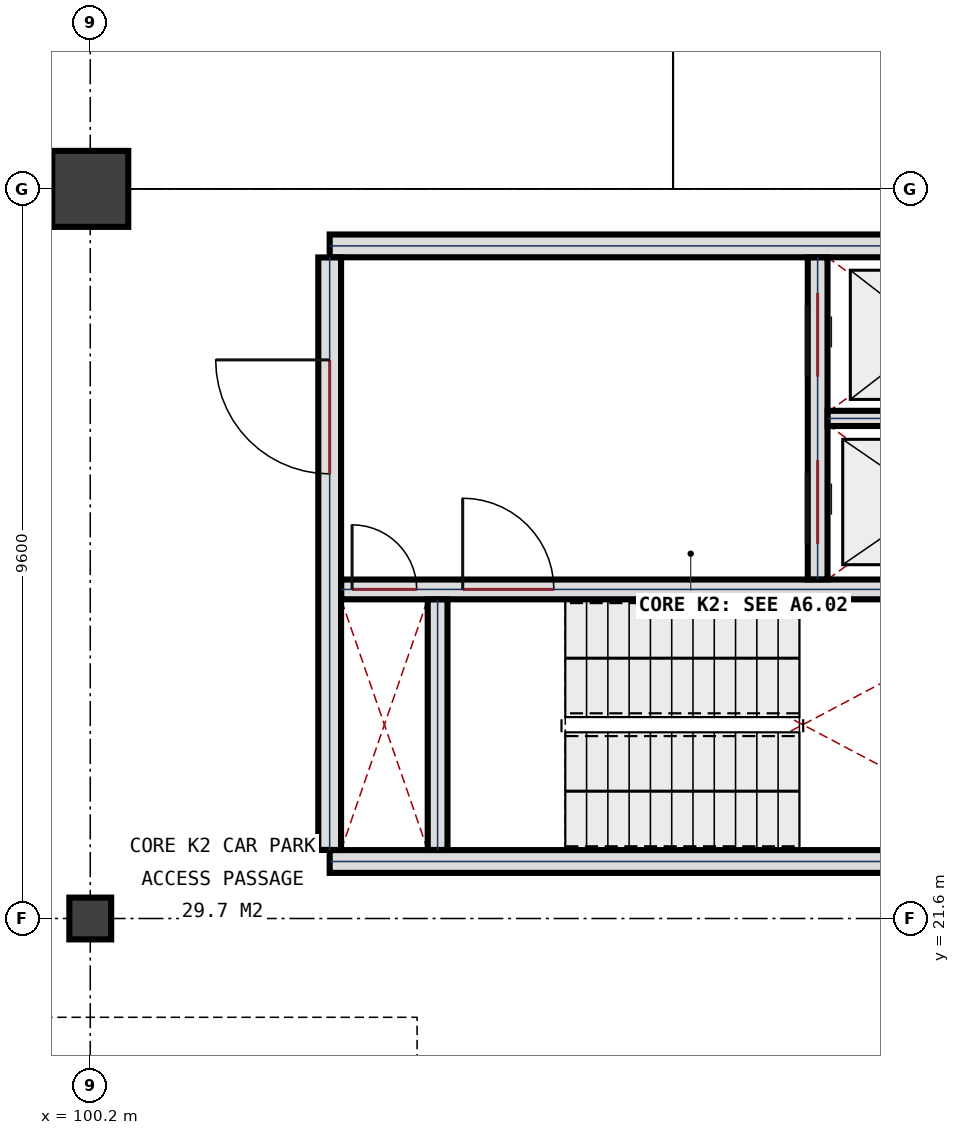
"""IFC4 building model, lengths in metres.
Left out: names, types, materials, properties, quantities, classifications, styles, units other than length and angle.
Written with IfcOpenShell. Run it as: python <this file> out.ifc"""

import sys

from ifc_helpers import new_model, si_unit, direction, frame, frame_2d, origin, origin_2d, place, context, subcontext, project, spatial, rectangle, extrude, element, fill, save


model = new_model("IFC4")
c1 = context("Model", 3, precision=1e-05, world=origin(), true_north=direction((0.0, 1.0)))
c2 = subcontext(c1, "Body", "Model", "MODEL_VIEW")
j1 = project(units=[si_unit("LENGTHUNIT", "METRE"), si_unit("PLANEANGLEUNIT", "RADIAN")], contexts=[c1])
p1 = place(None, origin())
s1 = spatial("IfcSite", under=j1, at=p1, CompositionType="ELEMENT")
p2 = place(p1, origin())
s2 = spatial("IfcBuilding", under=s1, at=p2, CompositionType="ELEMENT")
p3 = place(p2, frame((0.0, 0.0, -4.2)))
s3 = spatial("IfcBuildingStorey", under=s2, at=p3, CompositionType="ELEMENT", Elevation=-4.2)
p4 = place(p3, frame((100.2, 21.6, 0.0), z_axis=(0.0, 0.0, 1.0), x_axis=(1.0, 0.0, 0.0)))
e1 = element("IfcColumn", 1, at=p4, inside=s3, PredefinedType="COLUMN", context=c2, shape_type="SweptSolid", body=[
    extrude(rectangle(XDim=0.55, YDim=0.55, at=origin_2d()), origin(), (0.0, 0.0, 1.0), 4.2),
])
p5 = place(p3, frame((100.2, 31.2, 0.0), z_axis=(0.0, 0.0, 1.0), x_axis=(1.0, 0.0, 0.0)))
e2 = element("IfcColumn", 2, at=p5, inside=s3, PredefinedType="COLUMN", context=c2, shape_type="SweptSolid", body=[
    extrude(rectangle(XDim=1.0, YDim=1.0, at=origin_2d()), origin(), (0.0, 0.0, 1.0), 4.2),
])
for number, where, z_axis, x_axis in (
    (3, (112.85, 22.35, 0.0), (0.0, 0.0, 1.0), (-1.0, 0.0, 0.0)),
    (4, (103.35, 30.45, 0.0), (0.0, 0.0, 1.0), (1.0, 0.0, 0.0)),
):
    element("IfcWall", number, at=place(p3, frame(where, z_axis=z_axis, x_axis=x_axis)), inside=s3, PredefinedType="SHEAR", context=c2, shape_type="SweptSolid", body=[
        extrude(rectangle(XDim=9.5, YDim=0.3, at=frame_2d((4.75, 0.0))), origin(), (0.0, 0.0, 1.0), 4.2),
    ])
p6 = place(p3, frame((103.35, 22.502, 0.0), z_axis=(0.0, 0.0, 1.0), x_axis=(0.0, 1.0, 0.0)))
e5 = element("IfcWall", 5, at=p6, inside=s3, PredefinedType="SHEAR", context=c2, shape_type="SweptSolid", body=[
    extrude(rectangle(XDim=7.796, YDim=0.3, at=frame_2d((3.898, 0.0))), origin(), (0.0, 0.0, 1.0), 4.2),
])
p7 = place(p6, frame((4.948, 0.0, 0.0)))
e6 = element("IfcOpeningElement", 6, at=p7, cuts=e5, PredefinedType="OPENING", context=c2, shape_type="SweptSolid", body=[
    extrude(rectangle(XDim=1.5, YDim=2.25, at=frame_2d((0.75, 1.125))), frame((0.0, 0.16, 0.0), z_axis=(0.0, -1.0, 0.0), x_axis=(1.0, 0.0, 0.0)), (0.0, 0.0, 1.0), 0.32),
])
p8 = place(p3, frame((103.502, 25.93, 0.0), z_axis=(0.0, 0.0, 1.0), x_axis=(1.0, 0.0, 0.0)))
e7 = element("IfcWall", 7, at=p8, inside=s3, PredefinedType="SHEAR", context=c2, shape_type="SweptSolid", body=[
    extrude(rectangle(XDim=9.196, YDim=0.26, at=frame_2d((4.598, 0.0))), origin(), (0.0, 0.0, 1.0), 4.2),
])
p9 = place(p8, frame((1.598, 0.0, 0.0)))
e8 = element("IfcOpeningElement", 8, at=p9, cuts=e7, PredefinedType="OPENING", context=c2, shape_type="SweptSolid", body=[
    extrude(rectangle(XDim=1.2, YDim=2.2, at=frame_2d((0.6, 1.1))), frame((0.0, 0.14, 0.0), z_axis=(0.0, -1.0, 0.0), x_axis=(1.0, 0.0, 0.0)), (0.0, 0.0, 1.0), 0.28),
])
p10 = place(p8, frame((0.143, 0.0, 0.0)))
e9 = element("IfcOpeningElement", 9, at=p10, cuts=e7, PredefinedType="OPENING", context=c2, shape_type="SweptSolid", body=[
    extrude(rectangle(XDim=0.85, YDim=2.05, at=frame_2d((0.425, 1.025))), frame((0.0, 0.14, 0.0), z_axis=(0.0, -1.0, 0.0), x_axis=(1.0, 0.0, 0.0)), (0.0, 0.0, 1.0), 0.28),
])
p11 = place(p3, frame((104.77, 22.502, 0.0), z_axis=(0.0, 0.0, 1.0), x_axis=(0.0, 1.0, 0.0)))
e10 = element("IfcWall", 10, at=p11, inside=s3, PredefinedType="SHEAR", context=c2, shape_type="SweptSolid", body=[
    extrude(rectangle(XDim=3.296, YDim=0.26, at=frame_2d((1.648, 0.0))), origin(), (0.0, 0.0, 1.0), 4.2),
])
p12 = place(p3, frame((109.77, 26.062, 0.0), z_axis=(0.0, 0.0, 1.0), x_axis=(0.0, 1.0, 0.0)))
e11 = element("IfcWall", 11, at=p12, inside=s3, PredefinedType="SHEAR", context=c2, shape_type="SweptSolid", body=[
    extrude(rectangle(XDim=4.236, YDim=0.26, at=frame_2d((2.118, 0.0))), origin(), (0.0, 0.0, 1.0), 4.2),
])
p13 = place(p12, frame((0.468, 0.0, 0.0)))
e12 = element("IfcOpeningElement", 12, at=p13, cuts=e11, PredefinedType="OPENING", context=c2, shape_type="SweptSolid", body=[
    extrude(rectangle(XDim=1.1, YDim=2.15, at=frame_2d((0.55, 1.075))), frame((0.0, 0.14, 0.0), z_axis=(0.0, -1.0, 0.0), x_axis=(1.0, 0.0, 0.0)), (0.0, 0.0, 1.0), 0.28),
])
p14 = place(p12, frame((2.668, 0.0, 0.0)))
e13 = element("IfcOpeningElement", 13, at=p14, cuts=e11, PredefinedType="OPENING", context=c2, shape_type="SweptSolid", body=[
    extrude(rectangle(XDim=1.1, YDim=2.15, at=frame_2d((0.55, 1.075))), frame((0.0, 0.14, 0.0), z_axis=(0.0, -1.0, 0.0), x_axis=(1.0, 0.0, 0.0)), (0.0, 0.0, 1.0), 0.28),
])
p15 = place(p3, frame((109.902, 28.18, 0.0), z_axis=(0.0, 0.0, 1.0), x_axis=(1.0, 0.0, 0.0)))
e14 = element("IfcWall", 14, at=p15, inside=s3, PredefinedType="PLUMBINGWALL", context=c2, shape_type="SweptSolid", body=[
    extrude(rectangle(XDim=2.796, YDim=0.2, at=frame_2d((1.398, 0.0))), origin(), (0.0, 0.0, 1.0), 3.86),
])
p16 = place(p7, origin())
e15 = element("IfcDoor", 15, at=p16, inside=s3, OperationType="SINGLE_SWING_RIGHT", PredefinedType="DOOR", context=c2, shape_type="SweptSolid", body=[
    extrude(rectangle(XDim=1.5, YDim=2.25, at=frame_2d((0.75, 1.125))), frame((0.0, 0.032, 0.0), z_axis=(0.0, -1.0, 0.0), x_axis=(1.0, 0.0, 0.0)), (0.0, 0.0, 1.0), 0.065),
])
fill(e6, e15)
p17 = place(p9, origin())
e16 = element("IfcDoor", 16, at=p17, inside=s3, OperationType="SINGLE_SWING_LEFT", PredefinedType="DOOR", context=c2, shape_type="SweptSolid", body=[
    extrude(rectangle(XDim=1.2, YDim=2.2, at=frame_2d((0.6, 1.1))), frame((0.0, 0.032, 0.0), z_axis=(0.0, -1.0, 0.0), x_axis=(1.0, 0.0, 0.0)), (0.0, 0.0, 1.0), 0.065),
])
fill(e8, e16)
p18 = place(p10, origin())
e17 = element("IfcDoor", 17, at=p18, inside=s3, OperationType="SINGLE_SWING_LEFT", PredefinedType="DOOR", context=c2, shape_type="SweptSolid", body=[
    extrude(rectangle(XDim=0.85, YDim=2.05, at=frame_2d((0.425, 1.025))), frame((0.0, 0.032, 0.0), z_axis=(0.0, -1.0, 0.0), x_axis=(1.0, 0.0, 0.0)), (0.0, 0.0, 1.0), 0.065),
])
fill(e9, e17)
p19 = place(p13, origin())
e18 = element("IfcDoor", 18, at=p19, inside=s3, OperationType="SLIDING_TO_LEFT", PredefinedType="DOOR", context=c2, shape_type="SweptSolid", body=[
    extrude(rectangle(XDim=1.1, YDim=2.15, at=frame_2d((0.55, 1.075))), frame((0.0, 0.032, 0.0), z_axis=(0.0, -1.0, 0.0), x_axis=(1.0, 0.0, 0.0)), (0.0, 0.0, 1.0), 0.065),
])
fill(e12, e18)
p20 = place(p14, origin())
e19 = element("IfcDoor", 19, at=p20, inside=s3, OperationType="SLIDING_TO_LEFT", PredefinedType="DOOR", context=c2, shape_type="SweptSolid", body=[
    extrude(rectangle(XDim=1.1, YDim=2.15, at=frame_2d((0.55, 1.075))), frame((0.0, 0.032, 0.0), z_axis=(0.0, -1.0, 0.0), x_axis=(1.0, 0.0, 0.0)), (0.0, 0.0, 1.0), 0.065),
])
fill(e13, e19)
save(model, sys.argv[1])
